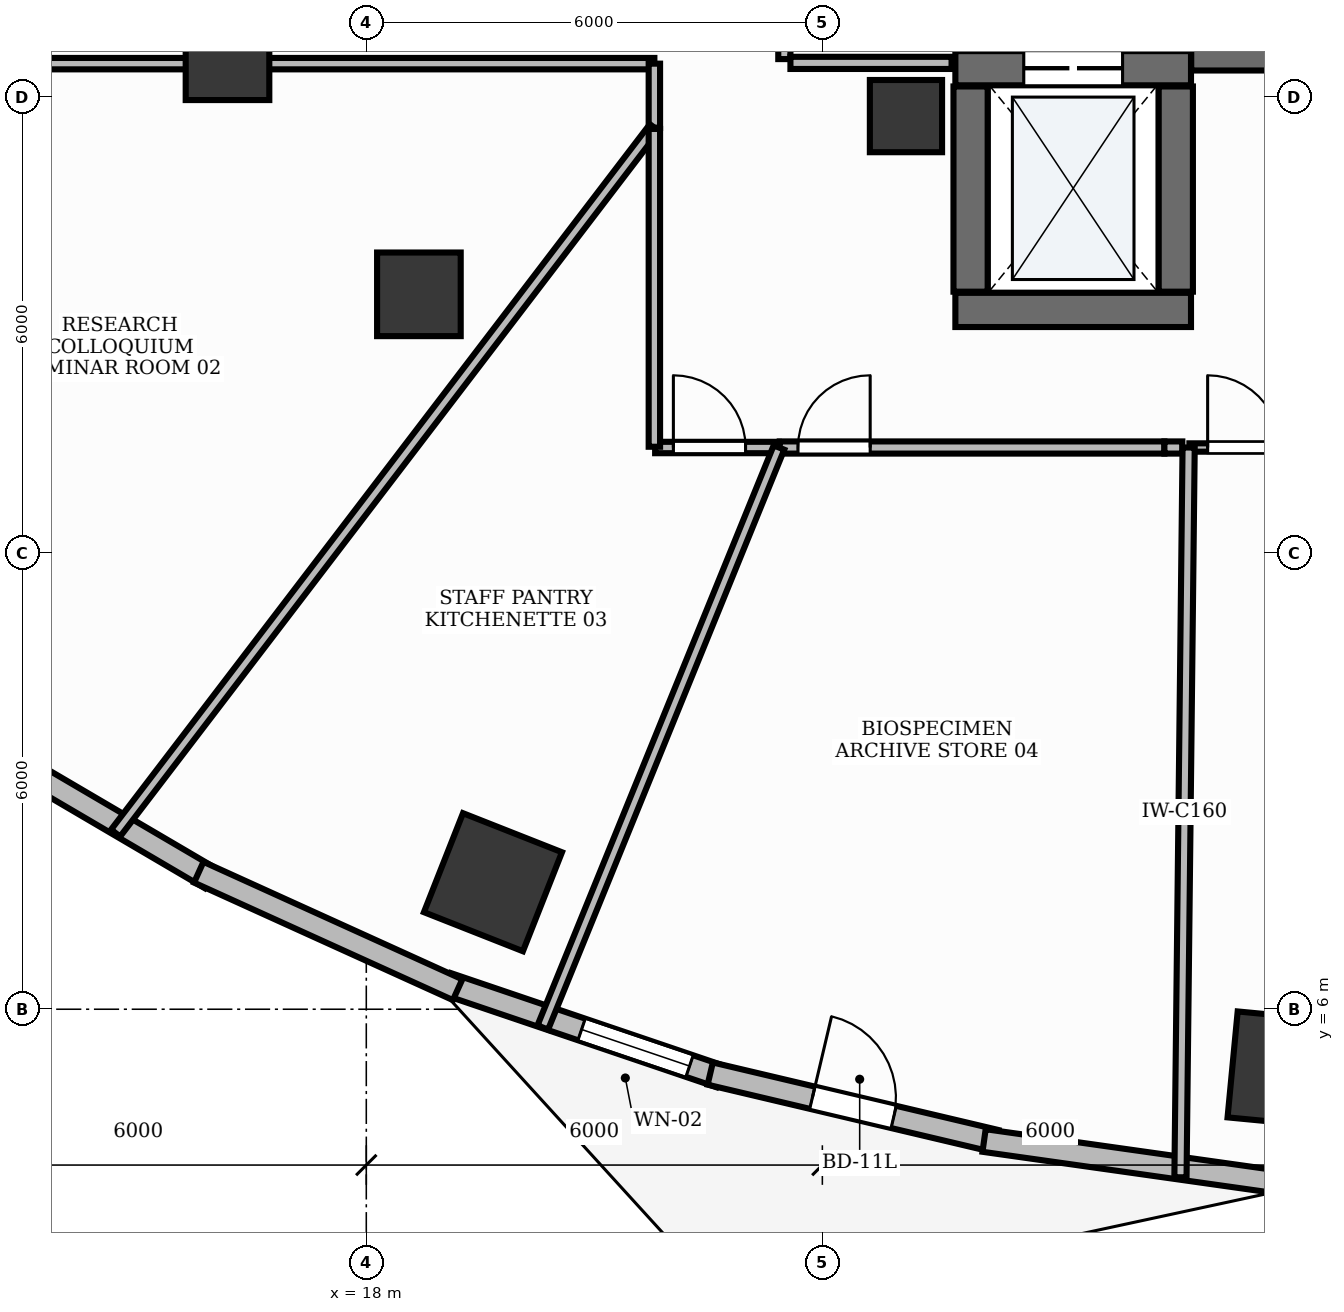
"""IFC4 building model, lengths in metres.
Left out: names, types, materials, properties, quantities, classifications, styles, units other than length and angle.
Written with IfcOpenShell. Run it as: python <this file> out.ifc"""

import sys

from ifc_helpers import new_model, si_unit, direction, frame, frame_2d, origin, origin_2d, place, context, subcontext, project, spatial, rectangle, extrude, element, fill, save


model = new_model("IFC4")
c1 = context("Model", 3, precision=1e-05, world=origin(), true_north=direction((0.0, 1.0)))
c2 = subcontext(c1, "Body", "Model", "MODEL_VIEW")
j1 = project(units=[si_unit("LENGTHUNIT", "METRE"), si_unit("PLANEANGLEUNIT", "RADIAN")], contexts=[c1])
p1 = place(None, origin())
s1 = spatial("IfcSite", under=j1, at=p1, CompositionType="ELEMENT")
p2 = place(p1, origin())
s2 = spatial("IfcBuilding", under=s1, at=p2, CompositionType="ELEMENT")
p3 = place(p2, frame((0.0, 0.0, 38.4)))
s3 = spatial("IfcBuildingStorey", under=s2, at=p3, CompositionType="ELEMENT", Elevation=38.4)
p4 = place(p3, frame((28.852, 18.575, 0.0), z_axis=(0.0, 0.0, 1.0), x_axis=(1.0, 0.0, 0.0)))
e1 = element("IfcWall", 1, at=p4, inside=s3, PredefinedType="SHEAR", context=c2, shape_type="SweptSolid", body=[
    extrude(rectangle(XDim=8.248, YDim=0.45, at=frame_2d((4.124, 0.0))), origin(), (0.0, 0.0, 1.0), 3.9),
])
p5 = place(p3, frame((25.75, 15.2, 0.0), z_axis=(0.0, 0.0, 1.0), x_axis=(1.0, 0.0, 0.0)))
e2 = element("IfcWall", 2, at=p5, inside=s3, PredefinedType="SHEAR", context=c2, shape_type="SweptSolid", body=[
    extrude(rectangle(XDim=3.1, YDim=0.45, at=frame_2d((1.55, 0.0))), origin(), (0.0, 0.0, 1.0), 3.9),
])
p6 = place(p3, frame((25.75, 18.38, 0.0), z_axis=(0.0, 0.0, 1.0), x_axis=(1.0, 0.0, 0.0)))
e3 = element("IfcWall", 3, at=p6, inside=s3, PredefinedType="SHEAR", context=c2, shape_type="SweptSolid", body=[
    extrude(rectangle(XDim=3.1, YDim=0.45, at=frame_2d((1.55, 0.0))), origin(), (0.0, 0.0, 1.0), 3.9),
])
p7 = place(p6, frame((0.9, 0.0, 0.0)))
e4 = element("IfcOpeningElement", 4, at=p7, cuts=e3, PredefinedType="OPENING", context=c2, shape_type="SweptSolid", body=[
    extrude(rectangle(XDim=1.3, YDim=2.2, at=frame_2d((0.65, 1.1))), frame((0.0, 0.24, 0.0), z_axis=(0.0, -1.0, 0.0), x_axis=(1.0, 0.0, 0.0)), (0.0, 0.0, 1.0), 0.48),
])
for number, where, z_axis, x_axis in (
    (5, (25.95, 15.44, 0.0), (0.0, 0.0, 1.0), (0.0, 1.0, 0.0)),
    (6, (28.65, 15.44, 0.0), (0.0, 0.0, 1.0), (0.0, 1.0, 0.0)),
):
    element("IfcWall", number, at=place(p3, frame(where, z_axis=z_axis, x_axis=x_axis)), inside=s3, PredefinedType="SHEAR", context=c2, shape_type="SweptSolid", body=[
        extrude(rectangle(XDim=2.7, YDim=0.45, at=frame_2d((1.35, 0.0))), origin(), (0.0, 0.0, 1.0), 3.9),
    ])
p8 = place(p3, frame((25.1, 17.75, -0.0), z_axis=(0.0, 0.0, 1.0), x_axis=(1.0, 0.0, 0.0)))
e7 = element("IfcColumn", 7, at=p8, inside=s3, PredefinedType="PILASTER", context=c2, shape_type="SweptSolid", body=[
    extrude(rectangle(XDim=0.95, YDim=0.95, at=origin_2d()), origin(), (0.0, 0.0, 1.0), 3.901),
])
for number, where, z_axis, x_axis in (
    (8, (16.174, 18.511, -0.0), (0.0, 0.0, 1.0), (1.0, 0.0, 0.0)),
    (9, (18.692, 15.405, -0.0), (0.0, 0.0, 1.0), (1.0, 0.0, 0.0)),
):
    element("IfcColumn", number, at=place(p3, frame(where, z_axis=z_axis, x_axis=x_axis)), inside=s3, PredefinedType="COLUMN", context=c2, shape_type="SweptSolid", body=[
        extrude(rectangle(XDim=1.1, YDim=1.1, at=origin_2d()), origin(), (0.0, 0.0, 1.0), 3.901),
    ])
for number, where, z_axis, x_axis in (
    (10, (19.667, 7.671, -0.0), (0.0, 0.0, 1.0), (-0.93, 0.367, 0.0)),
    (11, (30.094, 5.208, -0.0), (0.0, 0.0, 1.0), (-0.995, 0.095, 0.0)),
):
    element("IfcColumn", number, at=place(p3, frame(where, z_axis=z_axis, x_axis=x_axis)), inside=s3, PredefinedType="COLUMN", context=c2, shape_type="SweptSolid", body=[
        extrude(rectangle(XDim=1.4, YDim=1.4, at=origin_2d()), origin(), (0.0, 0.0, 1.0), 3.901),
    ])
p9 = place(p3, frame((19.065, 6.333, 0.0), z_axis=(0.0, 0.0, 1.0), x_axis=(0.947034337234, -0.321132315564, 0.0)))
e12 = element("IfcWall", 12, at=p9, inside=s3, PredefinedType="STANDARD", context=c2, shape_type="SweptSolid", body=[
    extrude(rectangle(XDim=3.79, YDim=0.3, at=frame_2d((1.895, 0.0))), origin(), (0.0, 0.0, 1.0), 3.47),
])
p10 = place(p9, frame((1.866, 0.0, 0.95)))
e13 = element("IfcOpeningElement", 13, at=p10, cuts=e12, PredefinedType="OPENING", context=c2, shape_type="SweptSolid", body=[
    extrude(rectangle(XDim=1.5, YDim=1.8, at=frame_2d((0.75, 0.9))), frame((0.0, 0.165, 0.0), z_axis=(0.0, -1.0, 0.0), x_axis=(1.0, 0.0, 0.0)), (0.0, 0.0, 1.0), 0.33),
])
p11 = place(p3, frame((22.525, 5.153, 0.0), z_axis=(0.0, 0.0, 1.0), x_axis=(0.973186156802, -0.230018921417, 0.0)))
e14 = element("IfcWall", 14, at=p11, inside=s3, PredefinedType="STANDARD", context=c2, shape_type="SweptSolid", body=[
    extrude(rectangle(XDim=3.861, YDim=0.3, at=frame_2d((1.931, 0.0))), origin(), (0.0, 0.0, 1.0), 3.9),
])
p12 = place(p11, frame((1.381, 0.0, 0.0)))
e15 = element("IfcOpeningElement", 15, at=p12, cuts=e14, PredefinedType="OPENING", context=c2, shape_type="SweptSolid", body=[
    extrude(rectangle(XDim=1.1, YDim=2.15, at=frame_2d((0.55, 1.075))), frame((0.0, 0.165, 0.0), z_axis=(0.0, -1.0, 0.0), x_axis=(1.0, 0.0, 0.0)), (0.0, 0.0, 1.0), 0.33),
])
p13 = place(p3, frame((12.815, 9.562, 0.0), z_axis=(0.0, 0.0, 1.0), x_axis=(0.8624654944, -0.506115867139, 0.0)))
e16 = element("IfcWall", 16, at=p13, inside=s3, PredefinedType="STANDARD", context=c2, shape_type="SweptSolid", body=[
    extrude(rectangle(XDim=3.635, YDim=0.3, at=frame_2d((1.818, 0.0))), origin(), (0.0, 0.0, 1.0), 3.9),
])
p14 = place(p3, frame((15.796, 7.802, 0.0), z_axis=(0.0, 0.0, 1.0), x_axis=(0.910623406862, -0.413237233166, 0.0)))
e17 = element("IfcWall", 17, at=p14, inside=s3, PredefinedType="STANDARD", context=c2, shape_type="SweptSolid", body=[
    extrude(rectangle(XDim=3.74, YDim=0.3, at=frame_2d((1.87, 0.0))), origin(), (0.0, 0.0, 1.0), 3.9),
])
p15 = place(p3, frame((26.128, 4.273, 0.0), z_axis=(0.0, 0.0, 1.0), x_axis=(0.990165832998, -0.139898617443, 0.0)))
e18 = element("IfcWall", 18, at=p15, inside=s3, PredefinedType="STANDARD", context=c2, shape_type="SweptSolid", body=[
    extrude(rectangle(XDim=3.951, YDim=0.3, at=frame_2d((1.976, 0.0))), origin(), (0.0, 0.0, 1.0), 3.47),
])
p16 = place(p3, frame((23.5, 18.5, 0.0), z_axis=(0.0, 0.0, 1.0), x_axis=(0.0, 1.0, 0.0)))
e19 = element("IfcWall", 19, at=p16, inside=s3, PredefinedType="PARTITIONING", context=c2, shape_type="SweptSolid", body=[
    extrude(rectangle(XDim=3.4, YDim=0.16, at=frame_2d((1.7, 0.0))), origin(), (0.0, 0.0, 1.0), 2.91),
])
p17 = place(p16, frame((1.175, 0.0, 0.0)))
e20 = element("IfcOpeningElement", 20, at=p17, cuts=e19, PredefinedType="OPENING", context=c2, shape_type="SweptSolid", body=[
    extrude(rectangle(XDim=1.05, YDim=2.15, at=frame_2d((0.525, 1.075))), frame((0.0, 0.095, 0.0), z_axis=(0.0, -1.0, 0.0), x_axis=(1.0, 0.0, 0.0)), (0.0, 0.0, 1.0), 0.19),
])
p18 = place(p3, frame((23.58, 18.45, 0.0), z_axis=(0.0, 0.0, 1.0), x_axis=(1.0, 0.0, 0.0)))
e21 = element("IfcWall", 21, at=p18, inside=s3, PredefinedType="PARTITIONING", context=c2, shape_type="SweptSolid", body=[
    extrude(rectangle(XDim=2.12, YDim=0.16, at=frame_2d((1.06, 0.0))), origin(), (0.0, 0.0, 1.0), 2.91),
])
p19 = place(p3, frame((11.59, 18.44, 0.0), z_axis=(0.0, 0.0, 1.0), x_axis=(1.0, 0.0, 0.0)))
e22 = element("IfcWall", 22, at=p19, inside=s3, PredefinedType="PARTITIONING", context=c2, shape_type="SweptSolid", body=[
    extrude(rectangle(XDim=10.2, YDim=0.15, at=frame_2d((5.1, 0.0))), origin(), (0.0, 0.0, 1.0), 2.91),
])
p20 = place(p19, frame((0.24, 0.0, 0.0)))
e23 = element("IfcOpeningElement", 23, at=p20, cuts=e22, PredefinedType="OPENING", context=c2, shape_type="SweptSolid", body=[
    extrude(rectangle(XDim=0.95, YDim=2.15, at=frame_2d((0.475, 1.075))), frame((0.0, 0.09, 0.0), z_axis=(0.0, -1.0, 0.0), x_axis=(1.0, 0.0, 0.0)), (0.0, 0.0, 1.0), 0.18),
])
p21 = place(p3, frame((21.8, 13.39, 0.0), z_axis=(0.0, 0.0, 1.0), x_axis=(1.0, 0.0, 0.0)))
e24 = element("IfcWall", 24, at=p21, inside=s3, PredefinedType="PARTITIONING", context=c2, shape_type="SweptSolid", body=[
    extrude(rectangle(XDim=1.629, YDim=0.15, at=frame_2d((0.814, 0.0))), origin(), (0.0, 0.0, 1.0), 2.91),
])
p22 = place(p21, frame((0.24, 0.0, 0.0)))
e25 = element("IfcOpeningElement", 25, at=p22, cuts=e24, PredefinedType="OPENING", context=c2, shape_type="SweptSolid", body=[
    extrude(rectangle(XDim=0.95, YDim=2.15, at=frame_2d((0.475, 1.075))), frame((0.0, 0.09, 0.0), z_axis=(0.0, -1.0, 0.0), x_axis=(1.0, 0.0, 0.0)), (0.0, 0.0, 1.0), 0.18),
])
p23 = place(p3, frame((23.439, 13.39, 0.0), z_axis=(0.0, 0.0, 1.0), x_axis=(1.0, 0.0, 0.0)))
e26 = element("IfcWall", 26, at=p23, inside=s3, PredefinedType="PARTITIONING", context=c2, shape_type="SweptSolid", body=[
    extrude(rectangle(XDim=5.061, YDim=0.16, at=frame_2d((2.53, 0.0))), origin(), (0.0, 0.0, 1.0), 2.91),
])
p24 = place(p23, frame((0.24, 0.0, 0.0)))
e27 = element("IfcOpeningElement", 27, at=p24, cuts=e26, PredefinedType="OPENING", context=c2, shape_type="SweptSolid", body=[
    extrude(rectangle(XDim=0.95, YDim=2.15, at=frame_2d((0.475, 1.075))), frame((0.0, 0.095, 0.0), z_axis=(0.0, -1.0, 0.0), x_axis=(1.0, 0.0, 0.0)), (0.0, 0.0, 1.0), 0.19),
])
p25 = place(p3, frame((28.829, 13.39, 0.0), z_axis=(0.0, 0.0, 1.0), x_axis=(1.0, 0.0, 0.0)))
e28 = element("IfcWall", 28, at=p25, inside=s3, PredefinedType="MOVABLE", context=c2, shape_type="SweptSolid", body=[
    extrude(rectangle(XDim=5.819, YDim=0.11, at=frame_2d((2.91, 0.0))), origin(), (0.0, 0.0, 1.0), 2.91),
])
p26 = place(p25, frame((0.24, 0.0, 0.0)))
e29 = element("IfcOpeningElement", 29, at=p26, cuts=e28, PredefinedType="OPENING", context=c2, shape_type="SweptSolid", body=[
    extrude(rectangle(XDim=0.95, YDim=2.15, at=frame_2d((0.475, 1.075))), frame((0.0, 0.07, 0.0), z_axis=(0.0, -1.0, 0.0), x_axis=(1.0, 0.0, 0.0)), (0.0, 0.0, 1.0), 0.14),
])
p27 = place(p3, frame((21.79, 18.44, 0.0), z_axis=(0.0, 0.0, 1.0), x_axis=(0.0, -1.0, 0.0)))
e30 = element("IfcWall", 30, at=p27, inside=s3, PredefinedType="PARTITIONING", context=c2, shape_type="SweptSolid", body=[
    extrude(rectangle(XDim=0.842, YDim=0.15, at=frame_2d((0.421, 0.0))), origin(), (0.0, 0.0, 1.0), 2.91),
])
p28 = place(p3, frame((21.79, 17.598, 0.0), z_axis=(0.0, 0.0, 1.0), x_axis=(-0.606985155119, -0.794713169304, 0.0)))
e31 = element("IfcWall", 31, at=p28, inside=s3, PredefinedType="PARTITIONING", context=c2, shape_type="SweptSolid", body=[
    extrude(rectangle(XDim=11.677, YDim=0.15, at=frame_2d((5.839, 0.0))), origin(), (0.0, 0.0, 1.0), 2.91),
])
p29 = place(p3, frame((21.79, 17.581, 0.0), z_axis=(0.0, 0.0, 1.0), x_axis=(0.0, -1.0, 0.0)))
e32 = element("IfcWall", 32, at=p29, inside=s3, PredefinedType="PARTITIONING", context=c2, shape_type="SweptSolid", body=[
    extrude(rectangle(XDim=4.181, YDim=0.15, at=frame_2d((2.091, 0.0))), origin(), (0.0, 0.0, 1.0), 2.91),
])
p30 = place(p3, frame((23.429, 13.39, 0.0), z_axis=(0.0, 0.0, 1.0), x_axis=(-0.377151920135, -0.926151407243, 0.0)))
e33 = element("IfcWall", 33, at=p30, inside=s3, PredefinedType="PARTITIONING", context=c2, shape_type="SweptSolid", body=[
    extrude(rectangle(XDim=8.239, YDim=0.15, at=frame_2d((4.119, 0.0))), origin(), (0.0, 0.0, 1.0), 2.91),
])
p31 = place(p3, frame((28.5, 13.39, 0.0), z_axis=(0.0, 0.0, 1.0), x_axis=(1.0, 0.0, 0.0)))
e34 = element("IfcWall", 34, at=p31, inside=s3, PredefinedType="PARTITIONING", context=c2, shape_type="SweptSolid", body=[
    extrude(rectangle(XDim=0.236, YDim=0.16, at=frame_2d((0.118, 0.0))), origin(), (0.0, 0.0, 1.0), 2.91),
])
p32 = place(p3, frame((28.819, 13.39, 0.0), z_axis=(0.0, 0.0, 1.0), x_axis=(-0.011213820346, -0.99993712314, 0.0)))
e35 = element("IfcWall", 35, at=p32, inside=s3, PredefinedType="PARTITIONING", context=c2, shape_type="SweptSolid", body=[
    extrude(rectangle(XDim=9.601, YDim=0.16, at=frame_2d((4.801, 0.0))), origin(), (0.0, 0.0, 1.0), 2.91),
])
p33 = place(p10, origin())
e36 = element("IfcWindow", 36, at=p33, inside=s3, PartitioningType="DOUBLE_PANEL_VERTICAL", PredefinedType="WINDOW", context=c2, shape_type="SweptSolid", body=[
    extrude(rectangle(XDim=1.5, YDim=1.8, at=frame_2d((0.75, 0.9))), frame((0.0, 0.03, 0.0), z_axis=(0.0, -1.0, 0.0), x_axis=(1.0, 0.0, 0.0)), (0.0, 0.0, 1.0), 0.06),
])
fill(e13, e36)
p34 = place(p12, origin())
e37 = element("IfcDoor", 37, at=p34, inside=s3, OperationType="SINGLE_SWING_LEFT", PredefinedType="DOOR", context=c2, shape_type="SweptSolid", body=[
    extrude(rectangle(XDim=1.1, YDim=2.15, at=frame_2d((0.55, 1.075))), frame((0.0, 0.025, 0.0), z_axis=(0.0, -1.0, 0.0), x_axis=(1.0, 0.0, 0.0)), (0.0, 0.0, 1.0), 0.05),
])
fill(e15, e37)
p35 = place(p7, origin())
e38 = element("IfcDoor", 38, at=p35, inside=s3, OperationType="DOUBLE_DOOR_SLIDING", PredefinedType="DOOR", context=c2, shape_type="SweptSolid", body=[
    extrude(rectangle(XDim=1.3, YDim=2.2, at=frame_2d((0.65, 1.1))), frame((0.0, 0.025, 0.0), z_axis=(0.0, -1.0, 0.0), x_axis=(1.0, 0.0, 0.0)), (0.0, 0.0, 1.0), 0.05),
])
fill(e4, e38)
p36 = place(p22, origin())
e39 = element("IfcDoor", 39, at=p36, inside=s3, OperationType="SINGLE_SWING_LEFT", PredefinedType="DOOR", context=c2, shape_type="SweptSolid", body=[
    extrude(rectangle(XDim=0.95, YDim=2.15, at=frame_2d((0.475, 1.075))), frame((0.0, 0.025, 0.0), z_axis=(0.0, -1.0, 0.0), x_axis=(1.0, 0.0, 0.0)), (0.0, 0.0, 1.0), 0.05),
])
fill(e25, e39)
p37 = place(p24, origin())
e40 = element("IfcDoor", 40, at=p37, inside=s3, OperationType="SINGLE_SWING_RIGHT", PredefinedType="DOOR", context=c2, shape_type="SweptSolid", body=[
    extrude(rectangle(XDim=0.95, YDim=2.15, at=frame_2d((0.475, 1.075))), frame((0.0, 0.025, 0.0), z_axis=(0.0, -1.0, 0.0), x_axis=(1.0, 0.0, 0.0)), (0.0, 0.0, 1.0), 0.05),
])
fill(e27, e40)
p38 = place(p26, origin())
e41 = element("IfcDoor", 41, at=p38, inside=s3, OperationType="SINGLE_SWING_LEFT", PredefinedType="DOOR", context=c2, shape_type="SweptSolid", body=[
    extrude(rectangle(XDim=0.95, YDim=2.15, at=frame_2d((0.475, 1.075))), frame((0.0, 0.025, 0.0), z_axis=(0.0, -1.0, 0.0), x_axis=(1.0, 0.0, 0.0)), (0.0, 0.0, 1.0), 0.05),
])
fill(e29, e41)
save(model, sys.argv[1])
